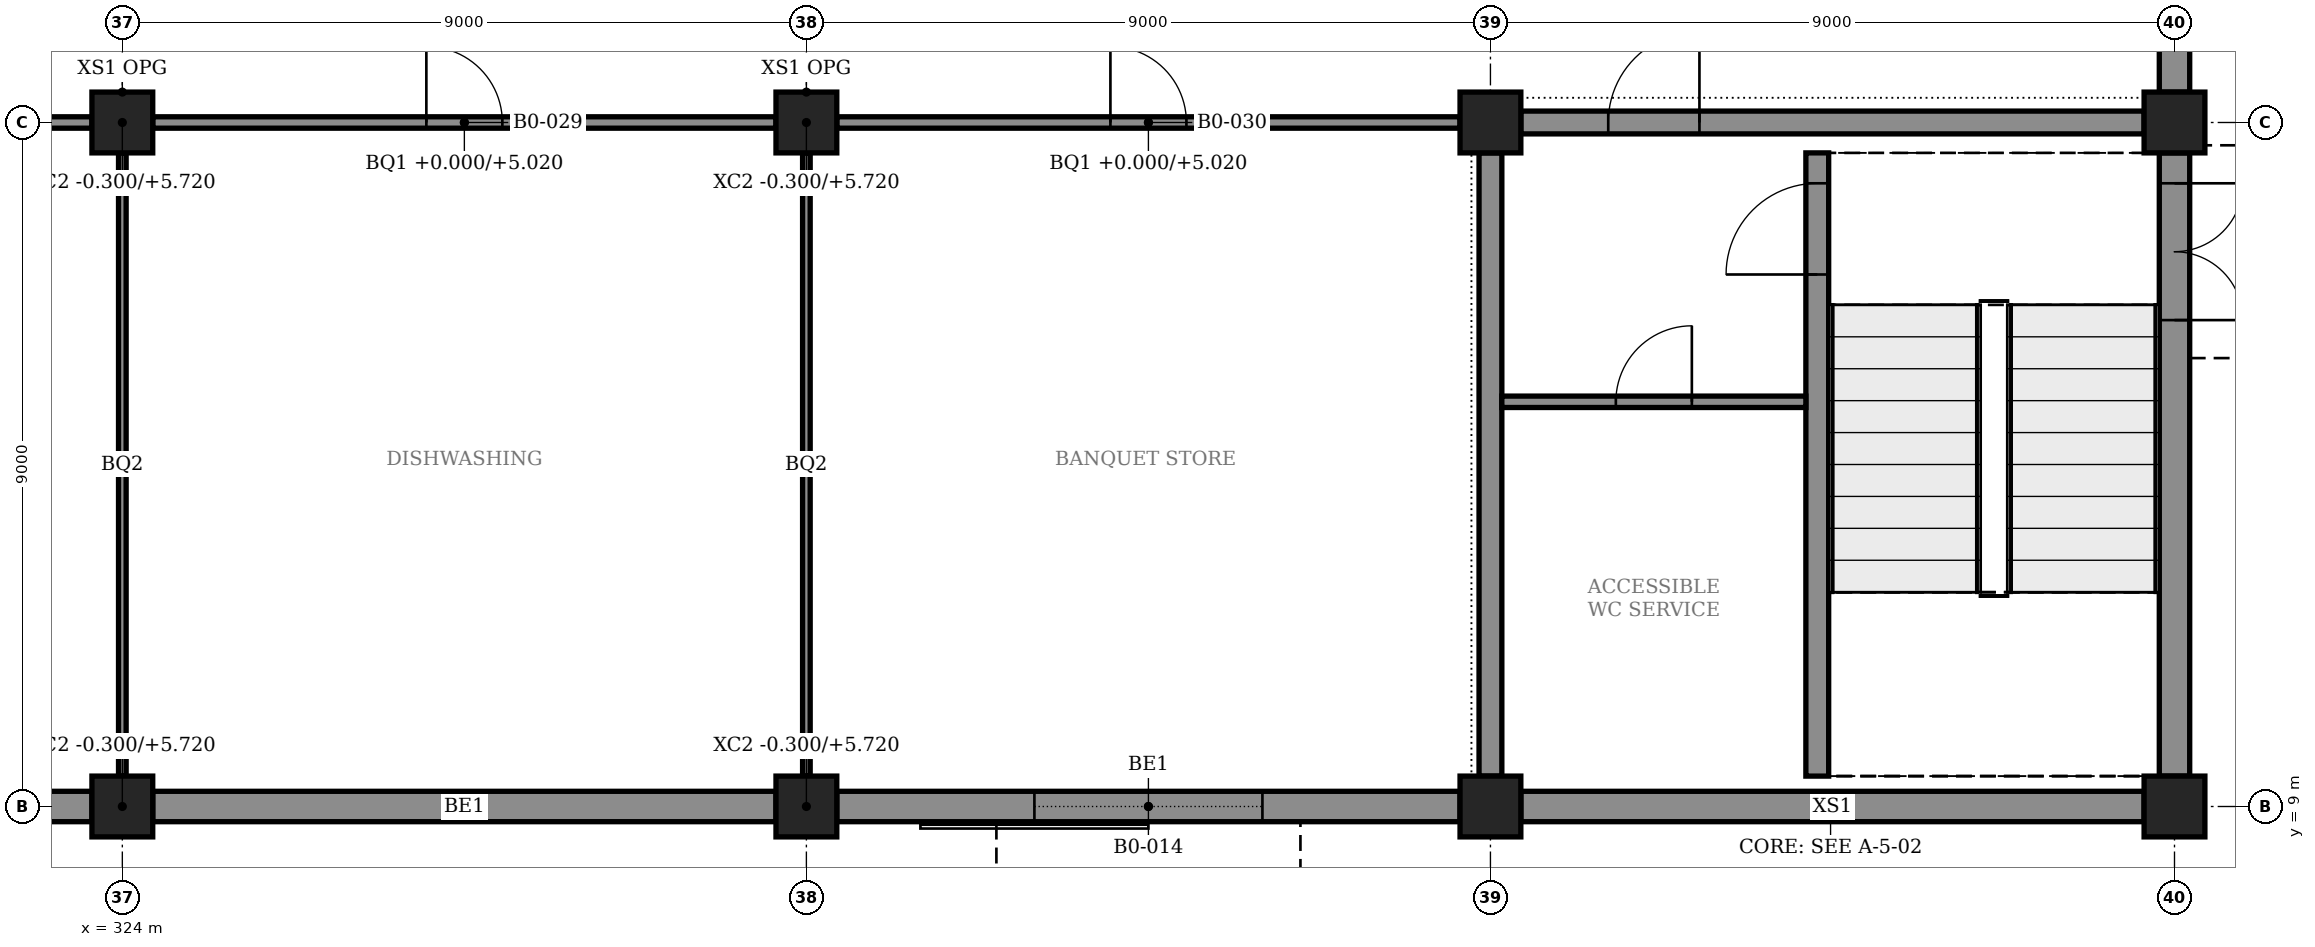
"""IFC4 building model, lengths in metres.
Left out: names, types, materials, properties, quantities, classifications, styles, units other than length and angle.
Written with IfcOpenShell. Run it as: python <this file> out.ifc"""

import sys

from ifc_helpers import new_model, si_unit, direction, frame, frame_2d, origin, origin_2d, place, context, subcontext, project, spatial, rectangle, extrude, element, fill, save


model = new_model("IFC4")
c1 = context("Model", 3, precision=1e-05, world=origin(), true_north=direction((0.0, 1.0)))
c2 = subcontext(c1, "Body", "Model", "MODEL_VIEW")
j1 = project(units=[si_unit("LENGTHUNIT", "METRE"), si_unit("PLANEANGLEUNIT", "RADIAN")], contexts=[c1])
p1 = place(None, origin())
s1 = spatial("IfcSite", under=j1, at=p1, CompositionType="ELEMENT")
p2 = place(p1, origin())
s2 = spatial("IfcBuilding", under=s1, at=p2, CompositionType="ELEMENT")
p3 = place(p2, origin())
s3 = spatial("IfcBuildingStorey", under=s2, at=p3, CompositionType="ELEMENT", Elevation=0.0)
for number, where, z_axis, x_axis in (
    (1, (324.0, 9.0, -0.3), (0.0, 0.0, 1.0), (1.0, 0.0, 0.0)),
    (2, (333.0, 9.0, -0.3), (0.0, 0.0, 1.0), (1.0, 0.0, 0.0)),
    (3, (342.0, 9.0, -0.3), (0.0, 0.0, 1.0), (1.0, 0.0, 0.0)),
    (4, (351.0, 9.0, -0.3), (0.0, 0.0, 1.0), (1.0, 0.0, 0.0)),
    (5, (324.0, 18.0, -0.3), (0.0, 0.0, 1.0), (1.0, 0.0, 0.0)),
    (6, (333.0, 18.0, -0.3), (0.0, 0.0, 1.0), (1.0, 0.0, 0.0)),
    (7, (342.0, 18.0, -0.3), (0.0, 0.0, 1.0), (1.0, 0.0, 0.0)),
    (8, (351.0, 18.0, -0.3), (0.0, 0.0, 1.0), (1.0, 0.0, 0.0)),
):
    element("IfcColumn", number, at=place(p3, frame(where, z_axis=z_axis, x_axis=x_axis)), inside=s3, PredefinedType="COLUMN", context=c2, shape_type="SweptSolid", body=[
        extrude(rectangle(XDim=0.8, YDim=0.8, at=origin_2d()), origin(), (0.0, 0.0, 1.0), 6.02),
    ])
p4 = place(p3, frame((351.0, 9.4, 0.0), z_axis=(0.0, 0.0, 1.0), x_axis=(0.0, 1.0, 0.0)))
e9 = element("IfcWall", 9, at=p4, inside=s3, PredefinedType="STANDARD", context=c2, shape_type="SweptSolid", body=[
    extrude(rectangle(XDim=8.2, YDim=0.4, at=frame_2d((4.1, 0.0))), origin(), (0.0, 0.0, 1.0), 5.02),
])
p5 = place(p4, frame((6.0, 0.0, 0.0)))
e10 = element("IfcOpeningElement", 10, at=p5, cuts=e9, PredefinedType="OPENING", context=c2, shape_type="SweptSolid", body=[
    extrude(rectangle(XDim=1.8, YDim=2.4, at=frame_2d((0.9, 1.2))), frame((0.0, 0.21, 0.0), z_axis=(0.0, -1.0, 0.0), x_axis=(1.0, 0.0, 0.0)), (0.0, 0.0, 1.0), 0.42),
])
p6 = place(p3, frame((351.0, 18.4, 0.0), z_axis=(0.0, 0.0, 1.0), x_axis=(0.0, 1.0, 0.0)))
e11 = element("IfcWall", 11, at=p6, inside=s3, PredefinedType="STANDARD", context=c2, shape_type="SweptSolid", body=[
    extrude(rectangle(XDim=8.2, YDim=0.4, at=frame_2d((4.1, 0.0))), origin(), (0.0, 0.0, 1.0), 5.02),
])
p7 = place(p6, frame((1.05, 0.0, 0.9)))
e12 = element("IfcOpeningElement", 12, at=p7, cuts=e11, PredefinedType="OPENING", context=c2, shape_type="SweptSolid", body=[
    extrude(rectangle(XDim=1.5, YDim=1.8, at=frame_2d((0.75, 0.9))), frame((0.0, 0.21, 0.0), z_axis=(0.0, -1.0, 0.0), x_axis=(1.0, 0.0, 0.0)), (0.0, 0.0, 1.0), 0.42),
])
p8 = place(p6, frame((3.55, 0.0, 0.9)))
e13 = element("IfcOpeningElement", 13, at=p8, cuts=e11, PredefinedType="OPENING", context=c2, shape_type="SweptSolid", body=[
    extrude(rectangle(XDim=1.5, YDim=1.8, at=frame_2d((0.75, 0.9))), frame((0.0, 0.21, 0.0), z_axis=(0.0, -1.0, 0.0), x_axis=(1.0, 0.0, 0.0)), (0.0, 0.0, 1.0), 0.42),
])
p9 = place(p6, frame((6.05, 0.0, 0.9)))
e14 = element("IfcOpeningElement", 14, at=p9, cuts=e11, PredefinedType="OPENING", context=c2, shape_type="SweptSolid", body=[
    extrude(rectangle(XDim=1.5, YDim=1.8, at=frame_2d((0.75, 0.9))), frame((0.0, 0.21, 0.0), z_axis=(0.0, -1.0, 0.0), x_axis=(1.0, 0.0, 0.0)), (0.0, 0.0, 1.0), 0.42),
])
for number, where, z_axis, x_axis in (
    (15, (315.4, 9.0, 0.0), (0.0, 0.0, 1.0), (1.0, 0.0, 0.0)),
    (16, (324.4, 9.0, 0.0), (0.0, 0.0, 1.0), (1.0, 0.0, 0.0)),
):
    element("IfcWall", number, at=place(p3, frame(where, z_axis=z_axis, x_axis=x_axis)), inside=s3, PredefinedType="STANDARD", context=c2, shape_type="SweptSolid", body=[
        extrude(rectangle(XDim=8.2, YDim=0.4, at=frame_2d((4.1, 0.0))), origin(), (0.0, 0.0, 1.0), 5.02),
    ])
p10 = place(p3, frame((333.4, 9.0, 0.0), z_axis=(0.0, 0.0, 1.0), x_axis=(1.0, 0.0, 0.0)))
e17 = element("IfcWall", 17, at=p10, inside=s3, PredefinedType="STANDARD", context=c2, shape_type="SweptSolid", body=[
    extrude(rectangle(XDim=8.2, YDim=0.4, at=frame_2d((4.1, 0.0))), origin(), (0.0, 0.0, 1.0), 5.02),
])
p11 = place(p10, frame((2.6, 0.0, 0.0)))
e18 = element("IfcOpeningElement", 18, at=p11, cuts=e17, PredefinedType="OPENING", context=c2, shape_type="SweptSolid", body=[
    extrude(rectangle(XDim=3.0, YDim=3.0, at=frame_2d((1.5, 1.5))), frame((0.0, 0.21, 0.0), z_axis=(0.0, -1.0, 0.0), x_axis=(1.0, 0.0, 0.0)), (0.0, 0.0, 1.0), 0.42),
])
p12 = place(p3, frame((342.4, 9.0, 0.0), z_axis=(0.0, 0.0, 1.0), x_axis=(1.0, 0.0, 0.0)))
e19 = element("IfcWall", 19, at=p12, inside=s3, PredefinedType="STANDARD", context=c2, shape_type="SweptSolid", body=[
    extrude(rectangle(XDim=8.2, YDim=0.4, at=frame_2d((4.1, 0.0))), origin(), (0.0, 0.0, 1.0), 5.02),
])
p13 = place(p3, frame((346.3, 9.4, 0.0), z_axis=(0.0, 0.0, 1.0), x_axis=(0.0, 1.0, 0.0)))
e20 = element("IfcWall", 20, at=p13, inside=s3, PredefinedType="STANDARD", context=c2, shape_type="SweptSolid", body=[
    extrude(rectangle(XDim=8.2, YDim=0.3, at=frame_2d((4.1, 0.0))), origin(), (0.0, 0.0, 1.0), 5.72),
])
p14 = place(p13, frame((6.6, 0.0, 0.0)))
e21 = element("IfcOpeningElement", 21, at=p14, cuts=e20, PredefinedType="OPENING", context=c2, shape_type="SweptSolid", body=[
    extrude(rectangle(XDim=1.2, YDim=2.4, at=frame_2d((0.6, 1.2))), frame((0.0, 0.16, 0.0), z_axis=(0.0, -1.0, 0.0), x_axis=(1.0, 0.0, 0.0)), (0.0, 0.0, 1.0), 0.32),
])
p15 = place(p3, frame((342.0, 9.4, 0.0), z_axis=(0.0, 0.0, 1.0), x_axis=(0.0, 1.0, 0.0)))
e22 = element("IfcWall", 22, at=p15, inside=s3, PredefinedType="STANDARD", context=c2, shape_type="SweptSolid", body=[
    extrude(rectangle(XDim=8.2, YDim=0.3, at=frame_2d((4.1, 0.0))), origin(), (0.0, 0.0, 1.0), 5.02),
])
p16 = place(p3, frame((342.4, 18.0, 0.0), z_axis=(0.0, 0.0, 1.0), x_axis=(1.0, 0.0, 0.0)))
e23 = element("IfcWall", 23, at=p16, inside=s3, PredefinedType="STANDARD", context=c2, shape_type="SweptSolid", body=[
    extrude(rectangle(XDim=8.2, YDim=0.3, at=frame_2d((4.1, 0.0))), origin(), (0.0, 0.0, 1.0), 5.02),
])
p17 = place(p16, frame((1.15, 0.0, 0.0)))
e24 = element("IfcOpeningElement", 24, at=p17, cuts=e23, PredefinedType="OPENING", context=c2, shape_type="SweptSolid", body=[
    extrude(rectangle(XDim=1.2, YDim=2.4, at=frame_2d((0.6, 1.2))), frame((0.0, 0.16, 0.0), z_axis=(0.0, -1.0, 0.0), x_axis=(1.0, 0.0, 0.0)), (0.0, 0.0, 1.0), 0.32),
])
p18 = place(p3, frame((342.15, 14.325, 0.0), z_axis=(0.0, 0.0, 1.0), x_axis=(1.0, 0.0, 0.0)))
e25 = element("IfcWall", 25, at=p18, inside=s3, PredefinedType="PARTITIONING", context=c2, shape_type="SweptSolid", body=[
    extrude(rectangle(XDim=4.0, YDim=0.15, at=frame_2d((2.0, 0.0))), origin(), (0.0, 0.0, 1.0), 5.72),
])
p19 = place(p18, frame((1.5, 0.0, 0.0)))
e26 = element("IfcOpeningElement", 26, at=p19, cuts=e25, PredefinedType="OPENING", context=c2, shape_type="SweptSolid", body=[
    extrude(rectangle(XDim=1.0, YDim=2.4, at=frame_2d((0.5, 1.2))), frame((0.0, 0.085, 0.0), z_axis=(0.0, -1.0, 0.0), x_axis=(1.0, 0.0, 0.0)), (0.0, 0.0, 1.0), 0.17),
])
p20 = place(p3, frame((315.4, 18.0, 0.0), z_axis=(0.0, 0.0, 1.0), x_axis=(1.0, 0.0, 0.0)))
e27 = element("IfcWall", 27, at=p20, inside=s3, PredefinedType="PARTITIONING", context=c2, shape_type="SweptSolid", body=[
    extrude(rectangle(XDim=8.2, YDim=0.15, at=frame_2d((4.1, 0.0))), origin(), (0.0, 0.0, 1.0), 5.02),
])
p21 = place(p3, frame((324.4, 18.0, 0.0), z_axis=(0.0, 0.0, 1.0), x_axis=(1.0, 0.0, 0.0)))
e28 = element("IfcWall", 28, at=p21, inside=s3, PredefinedType="PARTITIONING", context=c2, shape_type="SweptSolid", body=[
    extrude(rectangle(XDim=8.2, YDim=0.15, at=frame_2d((4.1, 0.0))), origin(), (0.0, 0.0, 1.0), 5.02),
])
p22 = place(p21, frame((3.6, 0.0, 0.0)))
e29 = element("IfcOpeningElement", 29, at=p22, cuts=e28, PredefinedType="OPENING", context=c2, shape_type="SweptSolid", body=[
    extrude(rectangle(XDim=1.0, YDim=2.4, at=frame_2d((0.5, 1.2))), frame((0.0, 0.085, 0.0), z_axis=(0.0, -1.0, 0.0), x_axis=(1.0, 0.0, 0.0)), (0.0, 0.0, 1.0), 0.17),
])
p23 = place(p3, frame((333.4, 18.0, 0.0), z_axis=(0.0, 0.0, 1.0), x_axis=(1.0, 0.0, 0.0)))
e30 = element("IfcWall", 30, at=p23, inside=s3, PredefinedType="PARTITIONING", context=c2, shape_type="SweptSolid", body=[
    extrude(rectangle(XDim=8.2, YDim=0.15, at=frame_2d((4.1, 0.0))), origin(), (0.0, 0.0, 1.0), 5.02),
])
p24 = place(p23, frame((3.6, 0.0, 0.0)))
e31 = element("IfcOpeningElement", 31, at=p24, cuts=e30, PredefinedType="OPENING", context=c2, shape_type="SweptSolid", body=[
    extrude(rectangle(XDim=1.0, YDim=2.4, at=frame_2d((0.5, 1.2))), frame((0.0, 0.085, 0.0), z_axis=(0.0, -1.0, 0.0), x_axis=(1.0, 0.0, 0.0)), (0.0, 0.0, 1.0), 0.17),
])
for number, where, z_axis, x_axis in (
    (32, (324.0, 9.4, 0.0), (0.0, 0.0, 1.0), (0.0, 1.0, 0.0)),
    (33, (333.0, 9.4, 0.0), (0.0, 0.0, 1.0), (0.0, 1.0, 0.0)),
):
    element("IfcWall", number, at=place(p3, frame(where, z_axis=z_axis, x_axis=x_axis)), inside=s3, PredefinedType="PARTITIONING", context=c2, shape_type="SweptSolid", body=[
        extrude(rectangle(XDim=8.2, YDim=0.1, at=frame_2d((4.1, 0.0))), origin(), (0.0, 0.0, 1.0), 5.02),
    ])
p25 = place(p5, frame((1.8, 0.0, 0.0), z_axis=(0.0, 0.0, 1.0), x_axis=(-1.0, 0.0, 0.0)))
e34 = element("IfcDoor", 34, at=p25, inside=s3, OperationType="DOUBLE_DOOR_SINGLE_SWING", PredefinedType="DOOR", context=c2, shape_type="SweptSolid", body=[
    extrude(rectangle(XDim=1.8, YDim=2.4, at=frame_2d((0.9, 1.2))), frame((0.0, 0.025, 0.0), z_axis=(0.0, -1.0, 0.0), x_axis=(1.0, 0.0, 0.0)), (0.0, 0.0, 1.0), 0.05),
])
fill(e10, e34)
p26 = place(p11, frame((3.0, 0.0, 0.0), z_axis=(0.0, 0.0, 1.0), x_axis=(-1.0, 0.0, 0.0)))
e35 = element("IfcDoor", 35, at=p26, inside=s3, OperationType="SLIDING_TO_LEFT", PredefinedType="DOOR", context=c2, shape_type="SweptSolid", body=[
    extrude(rectangle(XDim=3.0, YDim=3.0, at=frame_2d((1.5, 1.5))), frame((0.0, 0.025, 0.0), z_axis=(0.0, -1.0, 0.0), x_axis=(1.0, 0.0, 0.0)), (0.0, 0.0, 1.0), 0.05),
])
fill(e18, e35)
p27 = place(p14, origin())
e36 = element("IfcDoor", 36, at=p27, inside=s3, OperationType="SINGLE_SWING_LEFT", PredefinedType="DOOR", context=c2, shape_type="SweptSolid", body=[
    extrude(rectangle(XDim=1.2, YDim=2.4, at=frame_2d((0.6, 1.2))), frame((0.0, 0.025, 0.0), z_axis=(0.0, -1.0, 0.0), x_axis=(1.0, 0.0, 0.0)), (0.0, 0.0, 1.0), 0.05),
])
fill(e21, e36)
p28 = place(p17, origin())
e37 = element("IfcDoor", 37, at=p28, inside=s3, OperationType="SINGLE_SWING_RIGHT", PredefinedType="DOOR", context=c2, shape_type="SweptSolid", body=[
    extrude(rectangle(XDim=1.2, YDim=2.4, at=frame_2d((0.6, 1.2))), frame((0.0, 0.025, 0.0), z_axis=(0.0, -1.0, 0.0), x_axis=(1.0, 0.0, 0.0)), (0.0, 0.0, 1.0), 0.05),
])
fill(e24, e37)
p29 = place(p19, origin())
e38 = element("IfcDoor", 38, at=p29, inside=s3, OperationType="SINGLE_SWING_RIGHT", PredefinedType="DOOR", context=c2, shape_type="SweptSolid", body=[
    extrude(rectangle(XDim=1.0, YDim=2.4, at=frame_2d((0.5, 1.2))), frame((0.0, 0.025, 0.0), z_axis=(0.0, -1.0, 0.0), x_axis=(1.0, 0.0, 0.0)), (0.0, 0.0, 1.0), 0.05),
])
fill(e26, e38)
p30 = place(p22, origin())
e39 = element("IfcDoor", 39, at=p30, inside=s3, OperationType="SINGLE_SWING_LEFT", PredefinedType="DOOR", context=c2, shape_type="SweptSolid", body=[
    extrude(rectangle(XDim=1.0, YDim=2.4, at=frame_2d((0.5, 1.2))), frame((0.0, 0.025, 0.0), z_axis=(0.0, -1.0, 0.0), x_axis=(1.0, 0.0, 0.0)), (0.0, 0.0, 1.0), 0.05),
])
fill(e29, e39)
p31 = place(p24, origin())
e40 = element("IfcDoor", 40, at=p31, inside=s3, OperationType="SINGLE_SWING_LEFT", PredefinedType="DOOR", context=c2, shape_type="SweptSolid", body=[
    extrude(rectangle(XDim=1.0, YDim=2.4, at=frame_2d((0.5, 1.2))), frame((0.0, 0.025, 0.0), z_axis=(0.0, -1.0, 0.0), x_axis=(1.0, 0.0, 0.0)), (0.0, 0.0, 1.0), 0.05),
])
fill(e31, e40)
save(model, sys.argv[1])
